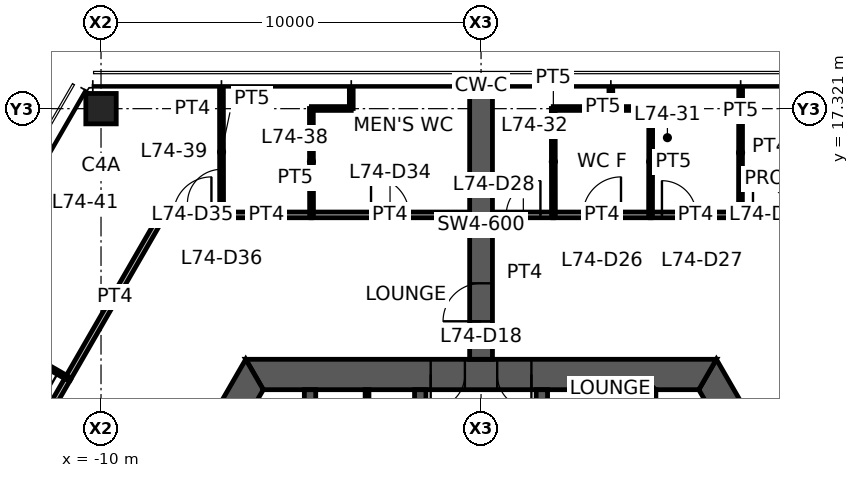
"""IFC4 building model, lengths in metres.
Left out: names, types, materials, properties, quantities, classifications, styles, units other than length and angle.
Written with IfcOpenShell. Run it as: python <this file> out.ifc"""

import sys

from ifc_helpers import new_model, si_unit, direction, frame, frame_2d, origin, origin_2d, place, context, subcontext, project, spatial, polyline, rectangle, hollow_rectangle, outline, extrude, element, fill, save


model = new_model("IFC4")
c1 = context("Model", 3, precision=1e-05, world=origin(), true_north=direction((0.0, 1.0)))
c2 = subcontext(c1, "Body", "Model", "MODEL_VIEW")
j1 = project(units=[si_unit("LENGTHUNIT", "METRE"), si_unit("PLANEANGLEUNIT", "RADIAN")], contexts=[c1])
p1 = place(None, origin())
s1 = spatial("IfcSite", under=j1, at=p1, CompositionType="ELEMENT")
p2 = place(p1, origin())
s2 = spatial("IfcBuilding", under=s1, at=p2, CompositionType="ELEMENT")
p3 = place(p2, frame((0.0, 0.0, 294.7)))
s3 = spatial("IfcBuildingStorey", under=s2, at=p3, CompositionType="ELEMENT", Elevation=294.7)
p4 = place(p3, frame((-10.0, 17.321, 0.0), z_axis=(0.0, 0.0, 1.0), x_axis=(1.0, 0.0, 0.0)))
e1 = element("IfcColumn", 1, at=p4, inside=s3, PredefinedType="COLUMN", context=c2, shape_type="SweptSolid", body=[
    extrude(hollow_rectangle(XDim=0.8, YDim=0.8, WallThickness=0.04, at=origin_2d()), origin(), (0.0, 0.0, 1.0), 3.9),
])
p5 = place(p3, frame((11.922, 0.0, 0.0), z_axis=(0.0, 0.0, 1.0), x_axis=(-0.500004296715, 0.866022923061, 0.0)))
e2 = element("IfcWall", 2, at=p5, inside=s3, PredefinedType="SHEAR", context=c2, shape_type="SweptSolid", body=[
    extrude(outline(polyline([(-0.231, -0.4), (5.835, -0.4), (6.635, -0.4), (12.153, -0.4), (11.691, 0.4), (6.635, 0.4), (5.835, 0.4), (0.231, 0.4), (-0.231, -0.4)])), origin(), (0.0, 0.0, 1.0), 3.9),
])
p6 = place(p5, frame((5.835, 0.0, 0.0)))
e3 = element("IfcOpeningElement", 3, at=p6, cuts=e2, PredefinedType="OPENING", context=c2, shape_type="SweptSolid", body=[
    extrude(rectangle(XDim=0.8, YDim=2.1, at=frame_2d((0.4, 1.05))), frame((0.0, 0.41, 0.0), z_axis=(0.0, -1.0, 0.0), x_axis=(1.0, 0.0, 0.0)), (0.0, 0.0, 1.0), 0.82),
])
p7 = place(p3, frame((5.961, 10.325, 0.0), z_axis=(0.0, 0.0, 1.0), x_axis=(-1.0, 0.0, 0.0)))
e4 = element("IfcWall", 4, at=p7, inside=s3, PredefinedType="SHEAR", context=c2, shape_type="SweptSolid", body=[
    extrude(outline(polyline([(-0.231, -0.4), (4.636, -0.4), (5.536, -0.4), (6.386, -0.4), (7.286, -0.4), (12.153, -0.4), (11.691, 0.4), (7.286, 0.4), (6.386, 0.4), (5.536, 0.4), (4.636, 0.4), (0.231, 0.4), (-0.231, -0.4)])), origin(), (0.0, 0.0, 1.0), 3.9),
])
p8 = place(p7, frame((6.386, 0.0, 0.0)))
e5 = element("IfcOpeningElement", 5, at=p8, cuts=e4, PredefinedType="OPENING", context=c2, shape_type="SweptSolid", body=[
    extrude(rectangle(XDim=0.9, YDim=2.1, at=frame_2d((0.45, 1.05))), frame((0.0, 0.41, 0.0), z_axis=(0.0, -1.0, 0.0), x_axis=(1.0, 0.0, 0.0)), (0.0, 0.0, 1.0), 0.82),
])
p9 = place(p7, frame((4.636, 0.0, 0.0)))
e6 = element("IfcOpeningElement", 6, at=p9, cuts=e4, PredefinedType="OPENING", context=c2, shape_type="SweptSolid", body=[
    extrude(rectangle(XDim=0.9, YDim=2.1, at=frame_2d((0.45, 1.05))), frame((0.0, 0.41, 0.0), z_axis=(0.0, -1.0, 0.0), x_axis=(1.0, 0.0, 0.0)), (0.0, 0.0, 1.0), 0.82),
])
p10 = place(p3, frame((-5.961, 10.325, 0.0), z_axis=(0.0, 0.0, 1.0), x_axis=(-0.500004296715, -0.866022923061, 0.0)))
e7 = element("IfcWall", 7, at=p10, inside=s3, PredefinedType="SHEAR", context=c2, shape_type="SweptSolid", body=[
    extrude(outline(polyline([(-0.231, -0.4), (4.494, -0.4), (5.494, -0.4), (12.153, -0.4), (11.691, 0.4), (5.494, 0.4), (4.494, 0.4), (0.231, 0.4), (-0.231, -0.4)])), origin(), (0.0, 0.0, 1.0), 3.9),
])
p11 = place(p10, frame((4.494, 0.0, 0.0)))
e8 = element("IfcOpeningElement", 8, at=p11, cuts=e7, PredefinedType="OPENING", context=c2, shape_type="SweptSolid", body=[
    extrude(rectangle(XDim=1.0, YDim=2.1, at=frame_2d((0.5, 1.05))), frame((0.0, 0.41, 0.0), z_axis=(0.0, -1.0, 0.0), x_axis=(1.0, 0.0, 0.0)), (0.0, 0.0, 1.0), 0.82),
])
p12 = place(p3, frame((0.0, 10.725, 0.0), z_axis=(0.0, 0.0, 1.0), x_axis=(0.0, 1.0, 0.0)))
e9 = element("IfcWall", 9, at=p12, inside=s3, PredefinedType="SHEAR", context=c2, shape_type="SweptSolid", body=[
    extrude(rectangle(XDim=7.045, YDim=0.6, at=frame_2d((3.523, 0.0))), origin(), (0.0, 0.0, 1.0), 3.9),
])
p13 = place(p12, frame((1.0, 0.0, 0.0)))
e10 = element("IfcOpeningElement", 10, at=p13, cuts=e9, PredefinedType="OPENING", context=c2, shape_type="SweptSolid", body=[
    extrude(rectangle(XDim=1.0, YDim=2.1, at=frame_2d((0.5, 1.05))), frame((0.0, 0.31, 0.0), z_axis=(0.0, -1.0, 0.0), x_axis=(1.0, 0.0, 0.0)), (0.0, 0.0, 1.0), 0.62),
])
p14 = place(p3, frame((-1.6, 3.75, 0.0), z_axis=(0.0, 0.0, 1.0), x_axis=(0.0, 1.0, 0.0)))
e11 = element("IfcWall", 11, at=p14, inside=s3, PredefinedType="SHEAR", context=c2, shape_type="SweptSolid", body=[
    extrude(rectangle(XDim=6.175, YDim=0.3, at=frame_2d((3.087, 0.0))), origin(), (0.0, 0.0, 1.0), 3.9),
])
p15 = place(p14, frame((3.8, 0.0, 0.0)))
e12 = element("IfcOpeningElement", 12, at=p15, cuts=e11, PredefinedType="OPENING", context=c2, shape_type="SweptSolid", body=[
    extrude(rectangle(XDim=0.9, YDim=2.1, at=frame_2d((0.45, 1.05))), frame((0.0, 0.16, 0.0), z_axis=(0.0, -1.0, 0.0), x_axis=(1.0, 0.0, 0.0)), (0.0, 0.0, 1.0), 0.32),
])
p16 = place(p3, frame((1.6, 3.75, 0.0), z_axis=(0.0, 0.0, 1.0), x_axis=(0.0, 1.0, 0.0)))
e13 = element("IfcWall", 13, at=p16, inside=s3, PredefinedType="SHEAR", context=c2, shape_type="SweptSolid", body=[
    extrude(rectangle(XDim=6.175, YDim=0.3, at=frame_2d((3.087, 0.0))), origin(), (0.0, 0.0, 1.0), 3.9),
])
p17 = place(p16, frame((3.8, 0.0, 0.0)))
e14 = element("IfcOpeningElement", 14, at=p17, cuts=e13, PredefinedType="OPENING", context=c2, shape_type="SweptSolid", body=[
    extrude(rectangle(XDim=0.9, YDim=2.1, at=frame_2d((0.45, 1.05))), frame((0.0, 0.16, 0.0), z_axis=(0.0, -1.0, 0.0), x_axis=(1.0, 0.0, 0.0)), (0.0, 0.0, 1.0), 0.32),
])
p18 = place(p3, frame((-4.5, 3.75, 0.0), z_axis=(0.0, 0.0, 1.0), x_axis=(0.0, 1.0, 0.0)))
e15 = element("IfcWall", 15, at=p18, inside=s3, PredefinedType="SHEAR", context=c2, shape_type="SweptSolid", body=[
    extrude(rectangle(XDim=6.175, YDim=0.3, at=frame_2d((3.087, 0.0))), origin(), (0.0, 0.0, 1.0), 3.9),
])
p19 = place(p3, frame((4.5, 7.15, 0.0), z_axis=(0.0, 0.0, 1.0), x_axis=(0.0, 1.0, 0.0)))
e16 = element("IfcWall", 16, at=p19, inside=s3, PredefinedType="STANDARD", context=c2, shape_type="SweptSolid", body=[
    extrude(rectangle(XDim=2.775, YDim=0.2, at=frame_2d((1.388, 0.0))), origin(), (0.0, 0.0, 1.0), 3.9),
])
p20 = place(p3, frame((-3.0, 6.55, 0.0), z_axis=(0.0, 0.0, 1.0), x_axis=(0.0, 1.0, 0.0)))
e17 = element("IfcWall", 17, at=p20, inside=s3, PredefinedType="PARTITIONING", context=c2, shape_type="SweptSolid", body=[
    extrude(rectangle(XDim=3.375, YDim=0.1, at=frame_2d((1.688, 0.0))), origin(), (0.0, 0.0, 1.0), 2.95),
])
p21 = place(p20, frame((2.075, 0.0, 0.0)))
e18 = element("IfcOpeningElement", 18, at=p21, cuts=e17, PredefinedType="OPENING", context=c2, shape_type="SweptSolid", body=[
    extrude(rectangle(XDim=0.9, YDim=2.1, at=frame_2d((0.45, 1.05))), frame((0.0, 0.06, 0.0), z_axis=(0.0, -1.0, 0.0), x_axis=(1.0, 0.0, 0.0)), (0.0, 0.0, 1.0), 0.12),
])
p22 = place(p20, frame((0.462, 0.0, 0.0)))
e19 = element("IfcOpeningElement", 19, at=p22, cuts=e17, PredefinedType="OPENING", context=c2, shape_type="SweptSolid", body=[
    extrude(rectangle(XDim=0.9, YDim=2.1, at=frame_2d((0.45, 1.05))), frame((0.0, 0.06, 0.0), z_axis=(0.0, -1.0, 0.0), x_axis=(1.0, 0.0, 0.0)), (0.0, 0.0, 1.0), 0.12),
])
p23 = place(p3, frame((3.0, 6.55, 0.0), z_axis=(0.0, 0.0, 1.0), x_axis=(0.0, 1.0, 0.0)))
e20 = element("IfcWall", 20, at=p23, inside=s3, PredefinedType="PARTITIONING", context=c2, shape_type="SweptSolid", body=[
    extrude(rectangle(XDim=3.375, YDim=0.1, at=frame_2d((1.688, 0.0))), origin(), (0.0, 0.0, 1.0), 2.95),
])
p24 = place(p23, frame((2.075, 0.0, 0.0)))
e21 = element("IfcOpeningElement", 21, at=p24, cuts=e20, PredefinedType="OPENING", context=c2, shape_type="SweptSolid", body=[
    extrude(rectangle(XDim=0.9, YDim=2.1, at=frame_2d((0.45, 1.05))), frame((0.0, 0.06, 0.0), z_axis=(0.0, -1.0, 0.0), x_axis=(1.0, 0.0, 0.0)), (0.0, 0.0, 1.0), 0.12),
])
p25 = place(p23, frame((0.462, 0.0, 0.0)))
e22 = element("IfcOpeningElement", 22, at=p25, cuts=e20, PredefinedType="OPENING", context=c2, shape_type="SweptSolid", body=[
    extrude(rectangle(XDim=0.9, YDim=2.1, at=frame_2d((0.45, 1.05))), frame((0.0, 0.06, 0.0), z_axis=(0.0, -1.0, 0.0), x_axis=(1.0, 0.0, 0.0)), (0.0, 0.0, 1.0), 0.12),
])
p26 = place(p3, frame((1.895, 14.525, 0.0), z_axis=(0.0, 0.0, 1.0), x_axis=(1.0, 0.0, 0.0)))
e23 = element("IfcWall", 23, at=p26, inside=s3, PredefinedType="PARTITIONING", context=c2, shape_type="SweptSolid", body=[
    extrude(rectangle(XDim=2.575, YDim=0.15, at=frame_2d((1.288, 0.0))), origin(), (0.0, 0.0, 1.0), 2.95),
])
p27 = place(p26, frame((0.788, 0.0, 0.0)))
e24 = element("IfcOpeningElement", 24, at=p27, cuts=e23, PredefinedType="OPENING", context=c2, shape_type="SweptSolid", body=[
    extrude(rectangle(XDim=1.0, YDim=2.1, at=frame_2d((0.5, 1.05))), frame((0.0, 0.085, 0.0), z_axis=(0.0, -1.0, 0.0), x_axis=(1.0, 0.0, 0.0)), (0.0, 0.0, 1.0), 0.17),
])
p28 = place(p3, frame((4.46, 14.525, 0.0), z_axis=(0.0, 0.0, 1.0), x_axis=(1.0, 0.0, 0.0)))
e25 = element("IfcWall", 25, at=p28, inside=s3, PredefinedType="PARTITIONING", context=c2, shape_type="SweptSolid", body=[
    extrude(rectangle(XDim=2.376, YDim=0.15, at=frame_2d((1.188, 0.0))), origin(), (0.0, 0.0, 1.0), 2.95),
])
p29 = place(p28, frame((0.3, 0.0, 0.0)))
e26 = element("IfcOpeningElement", 26, at=p29, cuts=e25, PredefinedType="OPENING", context=c2, shape_type="SweptSolid", body=[
    extrude(rectangle(XDim=0.9, YDim=2.1, at=frame_2d((0.45, 1.05))), frame((0.0, 0.085, 0.0), z_axis=(0.0, -1.0, 0.0), x_axis=(1.0, 0.0, 0.0)), (0.0, 0.0, 1.0), 0.17),
])
p30 = place(p3, frame((0.32, 14.525, 0.0), z_axis=(0.0, 0.0, 1.0), x_axis=(1.0, 0.0, 0.0)))
e27 = element("IfcWall", 27, at=p30, inside=s3, PredefinedType="PARTITIONING", context=c2, shape_type="SweptSolid", body=[
    extrude(rectangle(XDim=1.585, YDim=0.15, at=frame_2d((0.792, 0.0))), origin(), (0.0, 0.0, 1.0), 2.95),
])
p31 = place(p30, frame((0.343, 0.0, 0.0)))
e28 = element("IfcOpeningElement", 28, at=p31, cuts=e27, PredefinedType="OPENING", context=c2, shape_type="SweptSolid", body=[
    extrude(rectangle(XDim=0.9, YDim=2.1, at=frame_2d((0.45, 1.05))), frame((0.0, 0.085, 0.0), z_axis=(0.0, -1.0, 0.0), x_axis=(1.0, 0.0, 0.0)), (0.0, 0.0, 1.0), 0.17),
])
p32 = place(p3, frame((6.826, 14.525, 0.0), z_axis=(0.0, 0.0, 1.0), x_axis=(1.0, 0.0, 0.0)))
e29 = element("IfcWall", 29, at=p32, inside=s3, PredefinedType="PARTITIONING", context=c2, shape_type="SweptSolid", body=[
    extrude(rectangle(XDim=1.56, YDim=0.15, at=frame_2d((0.78, 0.0))), origin(), (0.0, 0.0, 1.0), 2.95),
])
p33 = place(p32, frame((0.33, 0.0, 0.0)))
e30 = element("IfcOpeningElement", 30, at=p33, cuts=e29, PredefinedType="OPENING", context=c2, shape_type="SweptSolid", body=[
    extrude(rectangle(XDim=0.9, YDim=2.1, at=frame_2d((0.45, 1.05))), frame((0.0, 0.085, 0.0), z_axis=(0.0, -1.0, 0.0), x_axis=(1.0, 0.0, 0.0)), (0.0, 0.0, 1.0), 0.17),
])
p34 = place(p3, frame((3.41, 17.325, 0.0), z_axis=(0.0, 0.0, 1.0), x_axis=(1.0, 0.0, 0.0)))
e31 = element("IfcWall", 31, at=p34, inside=s3, PredefinedType="PARTITIONING", context=c2, shape_type="SweptSolid", body=[
    extrude(rectangle(XDim=1.055, YDim=0.1, at=frame_2d((0.527, 0.0))), origin(), (0.0, 0.0, 1.0), 2.95),
])
p35 = place(p3, frame((4.465, 17.325, 0.0), z_axis=(0.0, 0.0, 1.0), x_axis=(-0.001831019688, -0.999998323682, 0.0)))
e32 = element("IfcWall", 32, at=p35, inside=s3, PredefinedType="PARTITIONING", context=c2, shape_type="SweptSolid", body=[
    extrude(rectangle(XDim=2.8, YDim=0.1, at=frame_2d((1.4, 0.0))), origin(), (0.0, 0.0, 1.0), 2.95),
])
p36 = place(p3, frame((1.9, 17.325, 0.0), z_axis=(0.0, 0.0, 1.0), x_axis=(1.0, 0.0, 0.0)))
e33 = element("IfcWall", 33, at=p36, inside=s3, PredefinedType="PARTITIONING", context=c2, shape_type="SweptSolid", body=[
    extrude(rectangle(XDim=1.521, YDim=0.1, at=frame_2d((0.76, 0.0))), origin(), (0.0, 0.0, 1.0), 2.95),
])
p37 = place(p3, frame((1.905, 14.525, 0.0), z_axis=(0.0, 0.0, 1.0), x_axis=(-0.001831019688, 0.999998323682, 0.0)))
e34 = element("IfcWall", 34, at=p37, inside=s3, PredefinedType="PARTITIONING", context=c2, shape_type="SweptSolid", body=[
    extrude(rectangle(XDim=2.8, YDim=0.1, at=frame_2d((1.4, 0.0))), origin(), (0.0, 0.0, 1.0), 2.95),
])
p38 = place(p3, frame((3.42, 17.325, 0.0), z_axis=(0.0, 0.0, 1.0), x_axis=(-0.010266399375, 0.999947299133, 0.0)))
e35 = element("IfcWall", 35, at=p38, inside=s3, PredefinedType="PARTITIONING", context=c2, shape_type="SweptSolid", body=[
    extrude(rectangle(XDim=0.476, YDim=0.1, at=frame_2d((0.238, 0.0))), origin(), (0.0, 0.0, 1.0), 2.95),
])
p39 = place(p3, frame((6.831, 17.801, 0.0), z_axis=(0.0, 0.0, 1.0), x_axis=(-0.001490644539, -0.999998888989, 0.0)))
e36 = element("IfcWall", 36, at=p39, inside=s3, PredefinedType="PARTITIONING", context=c2, shape_type="SweptSolid", body=[
    extrude(rectangle(XDim=3.276, YDim=0.1, at=frame_2d((1.638, 0.0))), origin(), (0.0, 0.0, 1.0), 2.95),
])
p40 = place(p3, frame((-4.47, 14.525, 0.0), z_axis=(0.0, 0.0, 1.0), x_axis=(1.0, 0.0, 0.0)))
e37 = element("IfcWall", 37, at=p40, inside=s3, PredefinedType="PARTITIONING", context=c2, shape_type="SweptSolid", body=[
    extrude(rectangle(XDim=4.15, YDim=0.15, at=frame_2d((2.075, 0.0))), origin(), (0.0, 0.0, 1.0), 2.95),
])
p41 = place(p40, frame((1.575, 0.0, 0.0)))
e38 = element("IfcOpeningElement", 38, at=p41, cuts=e37, PredefinedType="OPENING", context=c2, shape_type="SweptSolid", body=[
    extrude(rectangle(XDim=1.0, YDim=2.1, at=frame_2d((0.5, 1.05))), frame((0.0, 0.085, 0.0), z_axis=(0.0, -1.0, 0.0), x_axis=(1.0, 0.0, 0.0)), (0.0, 0.0, 1.0), 0.17),
])
p42 = place(p3, frame((-6.836, 14.525, 0.0), z_axis=(0.0, 0.0, 1.0), x_axis=(1.0, 0.0, 0.0)))
e39 = element("IfcWall", 39, at=p42, inside=s3, PredefinedType="PARTITIONING", context=c2, shape_type="SweptSolid", body=[
    extrude(rectangle(XDim=2.376, YDim=0.15, at=frame_2d((1.188, 0.0))), origin(), (0.0, 0.0, 1.0), 2.95),
])
p43 = place(p3, frame((-8.363, 14.525, 0.0), z_axis=(0.0, 0.0, 1.0), x_axis=(1.0, 0.0, 0.0)))
e40 = element("IfcWall", 40, at=p43, inside=s3, PredefinedType="PARTITIONING", context=c2, shape_type="SweptSolid", body=[
    extrude(rectangle(XDim=1.536, YDim=0.15, at=frame_2d((0.768, 0.0))), origin(), (0.0, 0.0, 1.0), 2.95),
])
p44 = place(p43, frame((0.268, 0.0, 0.0)))
e41 = element("IfcOpeningElement", 41, at=p44, cuts=e40, PredefinedType="OPENING", context=c2, shape_type="SweptSolid", body=[
    extrude(rectangle(XDim=1.0, YDim=2.1, at=frame_2d((0.5, 1.05))), frame((0.0, 0.085, 0.0), z_axis=(0.0, -1.0, 0.0), x_axis=(1.0, 0.0, 0.0)), (0.0, 0.0, 1.0), 0.17),
])
p45 = place(p3, frame((-4.465, 17.325, 0.0), z_axis=(0.0, 0.0, 1.0), x_axis=(1.0, 0.0, 0.0)))
e42 = element("IfcWall", 42, at=p45, inside=s3, PredefinedType="PARTITIONING", context=c2, shape_type="SweptSolid", body=[
    extrude(rectangle(XDim=1.05, YDim=0.1, at=frame_2d((0.525, 0.0))), origin(), (0.0, 0.0, 1.0), 2.95),
])
p46 = place(p3, frame((-4.46, 14.525, 0.0), z_axis=(0.0, 0.0, 1.0), x_axis=(-0.001831019688, 0.999998323682, 0.0)))
e43 = element("IfcWall", 43, at=p46, inside=s3, PredefinedType="PARTITIONING", context=c2, shape_type="SweptSolid", body=[
    extrude(rectangle(XDim=2.8, YDim=0.1, at=frame_2d((1.4, 0.0))), origin(), (0.0, 0.0, 1.0), 2.95),
])
p47 = place(p3, frame((-3.415, 17.325, 0.0), z_axis=(0.0, 0.0, 1.0), x_axis=(0.0, 1.0, 0.0)))
e44 = element("IfcWall", 44, at=p47, inside=s3, PredefinedType="PARTITIONING", context=c2, shape_type="SweptSolid", body=[
    extrude(rectangle(XDim=0.476, YDim=0.1, at=frame_2d((0.238, 0.0))), origin(), (0.0, 0.0, 1.0), 2.95),
])
p48 = place(p3, frame((-6.826, 14.525, 0.0), z_axis=(0.0, 0.0, 1.0), x_axis=(-0.001401178566, 0.999999018349, 0.0)))
e45 = element("IfcWall", 45, at=p48, inside=s3, PredefinedType="PARTITIONING", context=c2, shape_type="SweptSolid", body=[
    extrude(rectangle(XDim=3.311, YDim=0.1, at=frame_2d((1.655, 0.0))), origin(), (0.0, 0.0, 1.0), 2.95),
])
p49 = place(p48, frame((0.3, 0.0, 0.0)))
e46 = element("IfcOpeningElement", 46, at=p49, cuts=e45, PredefinedType="OPENING", context=c2, shape_type="SweptSolid", body=[
    extrude(rectangle(XDim=0.9, YDim=2.1, at=frame_2d((0.45, 1.05))), frame((0.0, 0.06, 0.0), z_axis=(0.0, -1.0, 0.0), x_axis=(1.0, 0.0, 0.0)), (0.0, 0.0, 1.0), 0.12),
])
p50 = place(p3, frame((-10.874, 10.216, 0.0), z_axis=(0.0, 0.0, 1.0), x_axis=(0.499988457423, 0.866032067792, 0.0)))
e47 = element("IfcWall", 47, at=p50, inside=s3, PredefinedType="PARTITIONING", context=c2, shape_type="SweptSolid", body=[
    extrude(rectangle(XDim=4.952, YDim=0.15, at=frame_2d((2.476, 0.0))), origin(), (0.0, 0.0, 1.0), 2.95),
])
p51 = place(p3, frame((-14.289, 4.301, 0.0), z_axis=(0.0, 0.0, 1.0), x_axis=(0.500020088259, 0.866013805512, 0.0)))
e48 = element("IfcWall", 48, at=p51, inside=s3, PredefinedType="PARTITIONING", context=c2, shape_type="SweptSolid", body=[
    extrude(rectangle(XDim=6.84, YDim=0.15, at=frame_2d((3.42, 0.0))), origin(), (0.0, 0.0, 1.0), 2.95),
])
p52 = place(p51, frame((2.92, 0.0, 0.0)))
e49 = element("IfcOpeningElement", 49, at=p52, cuts=e48, PredefinedType="OPENING", context=c2, shape_type="SweptSolid", body=[
    extrude(rectangle(XDim=1.0, YDim=2.1, at=frame_2d((0.5, 1.05))), frame((0.0, 0.085, 0.0), z_axis=(0.0, -1.0, 0.0), x_axis=(1.0, 0.0, 0.0)), (0.0, 0.0, 1.0), 0.17),
])
p53 = place(p3, frame((-10.869, 10.224, 0.0), z_axis=(0.0, 0.0, 1.0), x_axis=(-0.866757761015, 0.498729369218, 0.0)))
e50 = element("IfcWall", 50, at=p53, inside=s3, PredefinedType="PARTITIONING", context=c2, shape_type="SweptSolid", body=[
    extrude(rectangle(XDim=3.286, YDim=0.1, at=frame_2d((1.643, 0.0))), origin(), (0.0, 0.0, 1.0), 2.95),
])
p54 = place(p53, frame((0.3, 0.0, 0.0)))
e51 = element("IfcOpeningElement", 51, at=p54, cuts=e50, PredefinedType="OPENING", context=c2, shape_type="SweptSolid", body=[
    extrude(rectangle(XDim=0.9, YDim=2.1, at=frame_2d((0.45, 1.05))), frame((0.0, 0.06, 0.0), z_axis=(0.0, -1.0, 0.0), x_axis=(1.0, 0.0, 0.0)), (0.0, 0.0, 1.0), 0.12),
])
p55 = place(p3, frame((0.0, 17.771, 0.0), z_axis=(0.0, 0.0, 1.0), x_axis=(0.0, 1.0, 0.0)))
e52 = element("IfcWall", 52, at=p55, inside=s3, PredefinedType="PARTITIONING", context=c2, shape_type="SweptSolid", body=[
    extrude(rectangle(XDim=0.065, YDim=0.175, at=frame_2d((0.032, 0.0))), origin(), (0.0, 0.0, 1.0), 3.9),
])
p56 = place(p8, origin())
e53 = element("IfcDoor", 53, at=p56, inside=s3, OperationType="SINGLE_SWING_RIGHT", PredefinedType="DOOR", context=c2, shape_type="SweptSolid", body=[
    extrude(rectangle(XDim=0.9, YDim=2.1, at=frame_2d((0.45, 1.05))), frame((0.0, 0.025, 0.0), z_axis=(0.0, -1.0, 0.0), x_axis=(1.0, 0.0, 0.0)), (0.0, 0.0, 1.0), 0.05),
])
fill(e5, e53)
p57 = place(p9, origin())
e54 = element("IfcDoor", 54, at=p57, inside=s3, OperationType="SINGLE_SWING_LEFT", PredefinedType="DOOR", context=c2, shape_type="SweptSolid", body=[
    extrude(rectangle(XDim=0.9, YDim=2.1, at=frame_2d((0.45, 1.05))), frame((0.0, 0.025, 0.0), z_axis=(0.0, -1.0, 0.0), x_axis=(1.0, 0.0, 0.0)), (0.0, 0.0, 1.0), 0.05),
])
fill(e6, e54)
p58 = place(p13, origin())
e55 = element("IfcDoor", 55, at=p58, inside=s3, OperationType="SINGLE_SWING_LEFT", PredefinedType="DOOR", context=c2, shape_type="SweptSolid", body=[
    extrude(rectangle(XDim=1.0, YDim=2.1, at=frame_2d((0.5, 1.05))), frame((0.0, 0.025, 0.0), z_axis=(0.0, -1.0, 0.0), x_axis=(1.0, 0.0, 0.0)), (0.0, 0.0, 1.0), 0.05),
])
fill(e10, e55)
p59 = place(p27, origin())
e56 = element("IfcDoor", 56, at=p59, inside=s3, OperationType="SINGLE_SWING_RIGHT", PredefinedType="DOOR", context=c2, shape_type="SweptSolid", body=[
    extrude(rectangle(XDim=1.0, YDim=2.1, at=frame_2d((0.5, 1.05))), frame((0.0, 0.025, 0.0), z_axis=(0.0, -1.0, 0.0), x_axis=(1.0, 0.0, 0.0)), (0.0, 0.0, 1.0), 0.05),
])
fill(e24, e56)
p60 = place(p29, origin())
e57 = element("IfcDoor", 57, at=p60, inside=s3, OperationType="SINGLE_SWING_LEFT", PredefinedType="DOOR", context=c2, shape_type="SweptSolid", body=[
    extrude(rectangle(XDim=0.9, YDim=2.1, at=frame_2d((0.45, 1.05))), frame((0.0, 0.025, 0.0), z_axis=(0.0, -1.0, 0.0), x_axis=(1.0, 0.0, 0.0)), (0.0, 0.0, 1.0), 0.05),
])
fill(e26, e57)
p61 = place(p31, origin())
e58 = element("IfcDoor", 58, at=p61, inside=s3, OperationType="SINGLE_SWING_RIGHT", PredefinedType="DOOR", context=c2, shape_type="SweptSolid", body=[
    extrude(rectangle(XDim=0.9, YDim=2.1, at=frame_2d((0.45, 1.05))), frame((0.0, 0.025, 0.0), z_axis=(0.0, -1.0, 0.0), x_axis=(1.0, 0.0, 0.0)), (0.0, 0.0, 1.0), 0.05),
])
fill(e28, e58)
p62 = place(p33, origin())
e59 = element("IfcDoor", 59, at=p62, inside=s3, OperationType="SINGLE_SWING_LEFT", PredefinedType="DOOR", context=c2, shape_type="SweptSolid", body=[
    extrude(rectangle(XDim=0.9, YDim=2.1, at=frame_2d((0.45, 1.05))), frame((0.0, 0.025, 0.0), z_axis=(0.0, -1.0, 0.0), x_axis=(1.0, 0.0, 0.0)), (0.0, 0.0, 1.0), 0.05),
])
fill(e30, e59)
p63 = place(p41, origin())
e60 = element("IfcDoor", 60, at=p63, inside=s3, OperationType="SINGLE_SWING_LEFT", PredefinedType="DOOR", context=c2, shape_type="SweptSolid", body=[
    extrude(rectangle(XDim=1.0, YDim=2.1, at=frame_2d((0.5, 1.05))), frame((0.0, 0.025, 0.0), z_axis=(0.0, -1.0, 0.0), x_axis=(1.0, 0.0, 0.0)), (0.0, 0.0, 1.0), 0.05),
])
fill(e38, e60)
p64 = place(p44, origin())
e61 = element("IfcDoor", 61, at=p64, inside=s3, OperationType="SINGLE_SWING_RIGHT", PredefinedType="DOOR", context=c2, shape_type="SweptSolid", body=[
    extrude(rectangle(XDim=1.0, YDim=2.1, at=frame_2d((0.5, 1.05))), frame((0.0, 0.025, 0.0), z_axis=(0.0, -1.0, 0.0), x_axis=(1.0, 0.0, 0.0)), (0.0, 0.0, 1.0), 0.05),
])
fill(e41, e61)
p65 = place(p49, origin())
e62 = element("IfcDoor", 62, at=p65, inside=s3, OperationType="SINGLE_SWING_LEFT", PredefinedType="DOOR", context=c2, shape_type="SweptSolid", body=[
    extrude(rectangle(XDim=0.9, YDim=2.1, at=frame_2d((0.45, 1.05))), frame((0.0, 0.025, 0.0), z_axis=(0.0, -1.0, 0.0), x_axis=(1.0, 0.0, 0.0)), (0.0, 0.0, 1.0), 0.05),
])
fill(e46, e62)
p66 = place(p54, origin())
e63 = element("IfcDoor", 63, at=p66, inside=s3, OperationType="SINGLE_SWING_LEFT", PredefinedType="DOOR", context=c2, shape_type="SweptSolid", body=[
    extrude(rectangle(XDim=0.9, YDim=2.1, at=frame_2d((0.45, 1.05))), frame((0.0, 0.025, 0.0), z_axis=(0.0, -1.0, 0.0), x_axis=(1.0, 0.0, 0.0)), (0.0, 0.0, 1.0), 0.05),
])
fill(e51, e63)
save(model, sys.argv[1])
